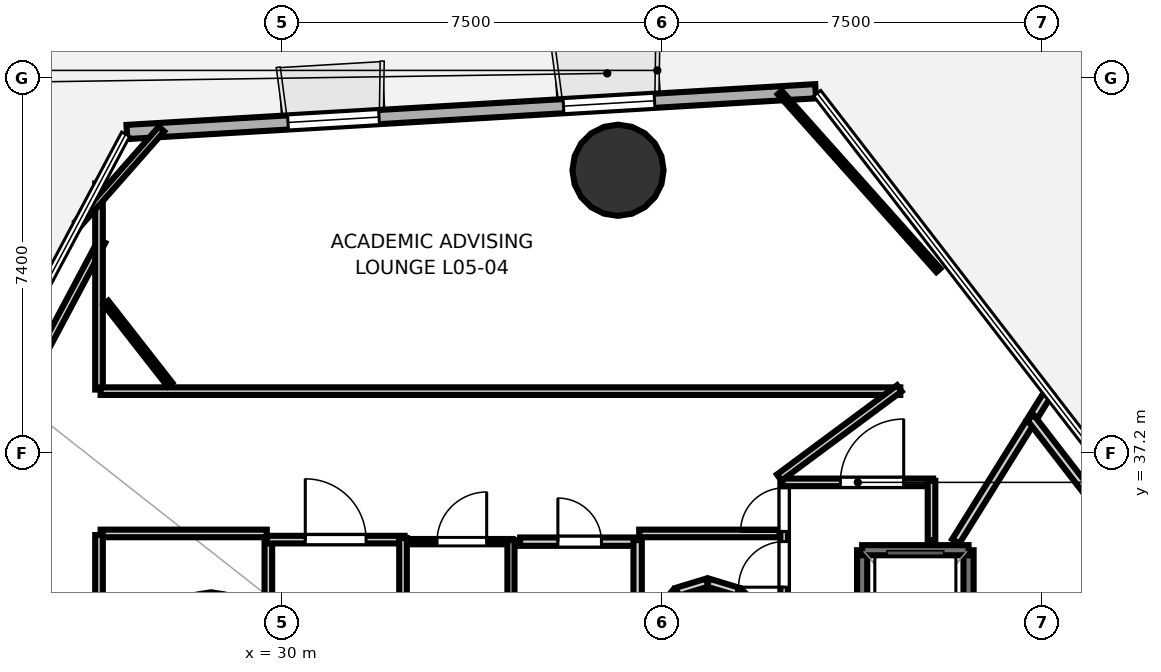
"""IFC4 building model, lengths in metres.
Left out: names, types, materials, properties, quantities, classifications, styles, units other than length and angle.
Written with IfcOpenShell. Run it as: python <this file> out.ifc"""

import sys

from ifc_helpers import new_model, si_unit, direction, frame, frame_2d, origin, origin_2d, place, context, subcontext, project, spatial, rectangle, hollow_circle, extrude, element, fill, save


model = new_model("IFC4")
c1 = context("Model", 3, precision=1e-05, world=origin(), true_north=direction((0.0, 1.0)))
c2 = subcontext(c1, "Body", "Model", "MODEL_VIEW")
j1 = project(units=[si_unit("LENGTHUNIT", "METRE"), si_unit("PLANEANGLEUNIT", "RADIAN")], contexts=[c1])
p1 = place(None, origin())
s1 = spatial("IfcSite", under=j1, at=p1, CompositionType="ELEMENT")
p2 = place(p1, origin())
s2 = spatial("IfcBuilding", under=s1, at=p2, CompositionType="ELEMENT")
p3 = place(p2, frame((0.0, 0.0, 25.7)))
s3 = spatial("IfcBuildingStorey", under=s2, at=p3, CompositionType="ELEMENT", Elevation=25.7)
for number, where, z_axis, x_axis in (
    (1, (28.6, 33.55, 0.0), (0.0, 0.0, 1.0), (1.0, 0.0, 0.0)),
    (2, (38.4, 33.55, 0.0), (0.0, 0.0, 1.0), (1.0, 0.0, 0.0)),
    (3, (36.632, 42.778, 0.0), (0.0, 0.0, 1.0), (1.0, 0.0, 0.0)),
):
    element("IfcColumn", number, at=place(p3, frame(where, z_axis=z_axis, x_axis=x_axis)), inside=s3, PredefinedType="COLUMN", context=c2, shape_type="SweptSolid", body=[
        extrude(hollow_circle(Radius=0.9, WallThickness=0.045, at=origin_2d()), origin(), (0.0, 0.0, 1.0), 3.7),
    ])
p4 = place(p3, frame((40.532, 44.337, 0.0), z_axis=(0.0, 0.0, 1.0), x_axis=(-0.998254407647, -0.059060457267, 0.0)))
e4 = element("IfcWall", 4, at=p4, inside=s3, PredefinedType="SOLIDWALL", context=c2, shape_type="SweptSolid", body=[
    extrude(rectangle(XDim=13.616, YDim=0.28, at=frame_2d((6.808, 0.0))), origin(), (0.0, 0.0, 1.0), 3.52),
])
p5 = place(p4, frame((3.185, 0.0, 0.85)))
e5 = element("IfcOpeningElement", 5, at=p5, cuts=e4, PredefinedType="OPENING", context=c2, shape_type="SweptSolid", body=[
    extrude(rectangle(XDim=1.8, YDim=2.1, at=frame_2d((0.9, 1.05))), frame((0.0, 0.15, 0.0), z_axis=(0.0, -1.0, 0.0), x_axis=(1.0, 0.0, 0.0)), (0.0, 0.0, 1.0), 0.3),
])
p6 = place(p4, frame((8.632, 0.0, 0.85)))
e6 = element("IfcOpeningElement", 6, at=p6, cuts=e4, PredefinedType="OPENING", context=c2, shape_type="SweptSolid", body=[
    extrude(rectangle(XDim=1.8, YDim=2.1, at=frame_2d((0.9, 1.05))), frame((0.0, 0.15, 0.0), z_axis=(0.0, -1.0, 0.0), x_axis=(1.0, 0.0, 0.0)), (0.0, 0.0, 1.0), 0.3),
])
for number, where, z_axis, x_axis in (
    (7, (43.55, 32.92, 0.0), (0.0, 0.0, 1.0), (0.0, 1.0, 0.0)),
    (8, (41.45, 32.92, 0.0), (0.0, 0.0, 1.0), (0.0, 1.0, 0.0)),
):
    element("IfcWall", number, at=place(p3, frame(where, z_axis=z_axis, x_axis=x_axis)), inside=s3, PredefinedType="SOLIDWALL", context=c2, shape_type="SweptSolid", body=[
        extrude(rectangle(XDim=2.36, YDim=0.2, at=frame_2d((1.18, 0.0))), origin(), (0.0, 0.0, 1.0), 3.52),
    ])
p7 = place(p3, frame((41.45, 35.28, 0.0), z_axis=(0.0, 0.0, 1.0), x_axis=(1.0, 0.0, 0.0)))
e9 = element("IfcWall", 9, at=p7, inside=s3, PredefinedType="SOLIDWALL", context=c2, shape_type="SweptSolid", body=[
    extrude(rectangle(XDim=2.1, YDim=0.2, at=frame_2d((1.05, 0.0))), origin(), (0.0, 0.0, 1.0), 3.52),
])
p8 = place(p3, frame((29.731, 33.058, 0.0), z_axis=(0.0, 0.0, 1.0), x_axis=(0.0, 1.0, 0.0)))
e10 = element("IfcWall", 10, at=p8, inside=s3, PredefinedType="PARTITIONING", context=c2, shape_type="SweptSolid", body=[
    extrude(rectangle(XDim=2.462, YDim=0.15, at=frame_2d((1.231, 0.0))), origin(), (0.0, 0.0, 1.0), 2.84),
])
p9 = place(p3, frame((29.7, 35.489, 0.0), z_axis=(0.0, 0.0, 1.0), x_axis=(1.0, 0.0, 0.0)))
e11 = element("IfcWall", 11, at=p9, inside=s3, PredefinedType="PARTITIONING", context=c2, shape_type="SweptSolid", body=[
    extrude(rectangle(XDim=2.72, YDim=0.15, at=frame_2d((1.36, 0.0))), origin(), (0.0, 0.0, 1.0), 2.84),
])
p10 = place(p9, frame((0.76, 0.0, 0.0)))
e12 = element("IfcOpeningElement", 12, at=p10, cuts=e11, PredefinedType="OPENING", context=c2, shape_type="SweptSolid", body=[
    extrude(rectangle(XDim=1.2, YDim=2.15, at=frame_2d((0.6, 1.075))), frame((0.0, 0.085, 0.0), z_axis=(0.0, -1.0, 0.0), x_axis=(1.0, 0.0, 0.0)), (0.0, 0.0, 1.0), 0.17),
])
p11 = place(p3, frame((32.389, 35.52, 0.0), z_axis=(0.0, 0.0, 1.0), x_axis=(0.0, -1.0, 0.0)))
e13 = element("IfcWall", 13, at=p11, inside=s3, PredefinedType="PARTITIONING", context=c2, shape_type="SweptSolid", body=[
    extrude(rectangle(XDim=2.462, YDim=0.15, at=frame_2d((1.231, 0.0))), origin(), (0.0, 0.0, 1.0), 2.84),
])
p12 = place(p3, frame((39.911, 32.64, 0.0), z_axis=(0.0, 0.0, 1.0), x_axis=(0.0, 1.0, 0.0)))
e14 = element("IfcWall", 14, at=p12, inside=s3, PredefinedType="PARTITIONING", context=c2, shape_type="SweptSolid", body=[
    extrude(rectangle(XDim=4.01, YDim=0.15, at=frame_2d((2.005, 0.0))), origin(), (0.0, 0.0, 1.0), 2.84),
])
p13 = place(p12, frame((3.01, 0.0, 0.0)))
e15 = element("IfcOpeningElement", 15, at=p13, cuts=e14, PredefinedType="OPENING", context=c2, shape_type="SweptSolid", body=[
    extrude(rectangle(XDim=0.86, YDim=2.05, at=frame_2d((0.43, 1.025))), frame((0.0, 0.085, 0.0), z_axis=(0.0, -1.0, 0.0), x_axis=(1.0, 0.0, 0.0)), (0.0, 0.0, 1.0), 0.17),
])
p14 = place(p12, frame((1.91, 0.0, 0.0)))
e16 = element("IfcOpeningElement", 16, at=p14, cuts=e14, PredefinedType="OPENING", context=c2, shape_type="SweptSolid", body=[
    extrude(rectangle(XDim=0.9, YDim=2.1, at=frame_2d((0.45, 1.05))), frame((0.0, 0.085, 0.0), z_axis=(0.0, -1.0, 0.0), x_axis=(1.0, 0.0, 0.0)), (0.0, 0.0, 1.0), 0.17),
])
p15 = place(p3, frame((39.88, 36.619, 0.0), z_axis=(0.0, 0.0, 1.0), x_axis=(1.0, 0.0, 0.0)))
e17 = element("IfcWall", 17, at=p15, inside=s3, PredefinedType="PARTITIONING", context=c2, shape_type="SweptSolid", body=[
    extrude(rectangle(XDim=2.97, YDim=0.15, at=frame_2d((1.485, 0.0))), origin(), (0.0, 0.0, 1.0), 2.84),
])
p16 = place(p15, frame((1.14, 0.0, 0.0)))
e18 = element("IfcOpeningElement", 18, at=p16, cuts=e17, PredefinedType="OPENING", context=c2, shape_type="SweptSolid", body=[
    extrude(rectangle(XDim=1.25, YDim=2.2, at=frame_2d((0.625, 1.1))), frame((0.0, 0.085, 0.0), z_axis=(0.0, -1.0, 0.0), x_axis=(1.0, 0.0, 0.0)), (0.0, 0.0, 1.0), 0.17),
])
p17 = place(p3, frame((42.819, 36.65, 0.0), z_axis=(0.0, 0.0, 1.0), x_axis=(0.0, -1.0, 0.0)))
e19 = element("IfcWall", 19, at=p17, inside=s3, PredefinedType="PARTITIONING", context=c2, shape_type="SweptSolid", body=[
    extrude(rectangle(XDim=1.17, YDim=0.15, at=frame_2d((0.585, 0.0))), origin(), (0.0, 0.0, 1.0), 2.84),
])
p18 = place(p3, frame((32.55, 35.449, 0.0), z_axis=(0.0, 0.0, 1.0), x_axis=(1.0, 0.0, 0.0)))
e20 = element("IfcWall", 20, at=p18, inside=s3, PredefinedType="PARTITIONING", context=c2, shape_type="SweptSolid", body=[
    extrude(rectangle(XDim=2.0, YDim=0.105, at=frame_2d((1.0, 0.0))), origin(), (0.0, 0.0, 1.0), 2.84),
])
p19 = place(p18, frame((0.51, 0.0, 0.0)))
e21 = element("IfcOpeningElement", 21, at=p19, cuts=e20, PredefinedType="OPENING", context=c2, shape_type="SweptSolid", body=[
    extrude(rectangle(XDim=0.98, YDim=2.1, at=frame_2d((0.49, 1.05))), frame((0.0, 0.062, 0.0), z_axis=(0.0, -1.0, 0.0), x_axis=(1.0, 0.0, 0.0)), (0.0, 0.0, 1.0), 0.125),
])
p20 = place(p3, frame((34.519, 35.48, 0.0), z_axis=(0.0, 0.0, 1.0), x_axis=(0.0, -1.0, 0.0)))
e22 = element("IfcWall", 22, at=p20, inside=s3, PredefinedType="PARTITIONING", context=c2, shape_type="SweptSolid", body=[
    extrude(rectangle(XDim=1.93, YDim=0.14, at=frame_2d((0.965, 0.0))), origin(), (0.0, 0.0, 1.0), 2.84),
])
p21 = place(p3, frame((34.7, 35.449, 0.0), z_axis=(0.0, 0.0, 1.0), x_axis=(1.0, 0.0, 0.0)))
e23 = element("IfcWall", 23, at=p21, inside=s3, PredefinedType="PLUMBINGWALL", context=c2, shape_type="SweptSolid", body=[
    extrude(rectangle(XDim=2.35, YDim=0.165, at=frame_2d((1.175, 0.0))), origin(), (0.0, 0.0, 1.0), 2.84),
])
p22 = place(p21, frame((0.745, 0.0, 0.0)))
e24 = element("IfcOpeningElement", 24, at=p22, cuts=e23, PredefinedType="OPENING", context=c2, shape_type="SweptSolid", body=[
    extrude(rectangle(XDim=0.86, YDim=2.05, at=frame_2d((0.43, 1.025))), frame((0.0, 0.093, 0.0), z_axis=(0.0, -1.0, 0.0), x_axis=(1.0, 0.0, 0.0)), (0.0, 0.0, 1.0), 0.185),
])
p23 = place(p3, frame((37.019, 35.48, 0.0), z_axis=(0.0, 0.0, 1.0), x_axis=(0.0, -1.0, 0.0)))
e25 = element("IfcWall", 25, at=p23, inside=s3, PredefinedType="PLUMBINGWALL", context=c2, shape_type="SweptSolid", body=[
    extrude(rectangle(XDim=1.93, YDim=0.165, at=frame_2d((0.965, 0.0))), origin(), (0.0, 0.0, 1.0), 2.84),
])
p24 = place(p3, frame((23.577, 35.984, 0.0), z_axis=(0.0, 0.0, 1.0), x_axis=(0.469485142528, 0.882940372248, 0.0)))
e26 = element("IfcWall", 26, at=p24, inside=s3, PredefinedType="PARTITIONING", context=c2, shape_type="SweptSolid", body=[
    extrude(rectangle(XDim=6.113, YDim=0.15, at=frame_2d((3.057, 0.0))), origin(), (0.0, 0.0, 1.0), 2.84),
])
p25 = place(p3, frame((26.389, 42.519, 0.0), z_axis=(0.0, 0.0, 1.0), x_axis=(0.0, -1.0, 0.0)))
e27 = element("IfcWall", 27, at=p25, inside=s3, PredefinedType="PARTITIONING", context=c2, shape_type="SweptSolid", body=[
    extrude(rectangle(XDim=4.069, YDim=0.15, at=frame_2d((2.034, 0.0))), origin(), (0.0, 0.0, 1.0), 2.84),
])
p26 = place(p3, frame((26.42, 38.419, 0.0), z_axis=(0.0, 0.0, 1.0), x_axis=(1.0, 0.0, 0.0)))
e28 = element("IfcWall", 28, at=p26, inside=s3, PredefinedType="PARTITIONING", context=c2, shape_type="SweptSolid", body=[
    extrude(rectangle(XDim=15.783, YDim=0.15, at=frame_2d((7.892, 0.0))), origin(), (0.0, 0.0, 1.0), 2.798),
])
p27 = place(p3, frame((42.185, 38.475, 0.0), z_axis=(0.0, 0.0, 1.0), x_axis=(-0.802818467394, -0.596223538961, 0.0)))
e29 = element("IfcWall", 29, at=p27, inside=s3, PredefinedType="PARTITIONING", context=c2, shape_type="SweptSolid", body=[
    extrude(rectangle(XDim=2.953, YDim=0.15, at=frame_2d((1.477, 0.0))), origin(), (0.0, 0.0, 1.0), 2.798),
])
p28 = place(p3, frame((39.818, 35.611, 0.0), z_axis=(0.0, 0.0, 1.0), x_axis=(-1.0, 0.0, 0.0)))
e30 = element("IfcWall", 30, at=p28, inside=s3, PredefinedType="PARTITIONING", context=c2, shape_type="SweptSolid", body=[
    extrude(rectangle(XDim=2.768, YDim=0.15, at=frame_2d((1.384, 0.0))), origin(), (0.0, 0.0, 1.0), 2.84),
])
p29 = place(p3, frame((29.7, 35.611, 0.0), z_axis=(0.0, 0.0, 1.0), x_axis=(-1.0, 0.0, 0.0)))
e31 = element("IfcWall", 31, at=p29, inside=s3, PredefinedType="PARTITIONING", context=c2, shape_type="SweptSolid", body=[
    extrude(rectangle(XDim=3.28, YDim=0.15, at=frame_2d((1.64, 0.0))), origin(), (0.0, 0.0, 1.0), 2.798),
])
p30 = place(p3, frame((26.389, 35.58, 0.0), z_axis=(0.0, 0.0, 1.0), x_axis=(0.0, -1.0, 0.0)))
e32 = element("IfcWall", 32, at=p30, inside=s3, PredefinedType="PARTITIONING", context=c2, shape_type="SweptSolid", body=[
    extrude(rectangle(XDim=2.71, YDim=0.15, at=frame_2d((1.355, 0.0))), origin(), (0.0, 0.0, 1.0), 2.798),
])
p31 = place(p3, frame((43.297, 35.453, 0.0), z_axis=(0.0, 0.0, 1.0), x_axis=(0.529177490016, 0.848511157298, 0.0)))
e33 = element("IfcWall", 33, at=p31, inside=s3, PredefinedType="PLUMBINGWALL", context=c2, shape_type="SweptSolid", body=[
    extrude(rectangle(XDim=3.474, YDim=0.165, at=frame_2d((1.737, 0.0))), origin(), (0.0, 0.0, 1.0), 2.798),
])
p32 = place(p3, frame((44.772, 37.897, 0.0), z_axis=(0.0, 0.0, 1.0), x_axis=(0.61079855593, -0.791786034275, 0.0)))
e34 = element("IfcWall", 34, at=p32, inside=s3, PredefinedType="PLUMBINGWALL", context=c2, shape_type="SweptSolid", body=[
    extrude(rectangle(XDim=15.177, YDim=0.165, at=frame_2d((7.588, 0.0))), origin(), (0.0, 0.0, 1.0), 2.798),
])
p33 = place(p3, frame((39.303, 34.161, 0.0), z_axis=(0.0, 0.0, 1.0), x_axis=(-0.707106781187, 0.707106781187, 0.0)))
e35 = element("IfcWall", 35, at=p33, inside=s3, PredefinedType="PLUMBINGWALL", context=c2, shape_type="SweptSolid", body=[
    extrude(rectangle(XDim=0.414, YDim=0.165, at=frame_2d((0.207, 0.0))), origin(), (0.0, 0.0, 1.0), 2.84),
])
p34 = place(p3, frame((38.998, 34.461, 0.0), z_axis=(0.0, 0.0, 1.0), x_axis=(-0.956904203315, 0.290403763195, 0.0)))
e36 = element("IfcWall", 36, at=p34, inside=s3, PredefinedType="PLUMBINGWALL", context=c2, shape_type="SweptSolid", body=[
    extrude(rectangle(XDim=0.615, YDim=0.165, at=frame_2d((0.308, 0.0))), origin(), (0.0, 0.0, 1.0), 2.84),
])
p35 = place(p3, frame((38.391, 34.64, 0.0), z_axis=(0.0, 0.0, 1.0), x_axis=(-0.956937641938, -0.290293557355, 0.0)))
e37 = element("IfcWall", 37, at=p35, inside=s3, PredefinedType="PLUMBINGWALL", context=c2, shape_type="SweptSolid", body=[
    extrude(rectangle(XDim=0.616, YDim=0.165, at=frame_2d((0.308, 0.0))), origin(), (0.0, 0.0, 1.0), 2.84),
])
p36 = place(p3, frame((37.787, 34.451, 0.0), z_axis=(0.0, 0.0, 1.0), x_axis=(-0.634468611637, -0.77294862756, 0.0)))
e38 = element("IfcWall", 38, at=p36, inside=s3, PredefinedType="PLUMBINGWALL", context=c2, shape_type="SweptSolid", body=[
    extrude(rectangle(XDim=0.615, YDim=0.165, at=frame_2d((0.308, 0.0))), origin(), (0.0, 0.0, 1.0), 2.84),
])
p37 = place(p3, frame((27.788, 38.549, 0.0), z_axis=(0.0, 0.0, 1.0), x_axis=(-0.615602497153, 0.788056828851, 0.0)))
e39 = element("IfcWall", 39, at=p37, inside=s3, PredefinedType="PARTITIONING", context=c2, shape_type="SweptSolid", body=[
    extrude(rectangle(XDim=2.053, YDim=0.12, at=frame_2d((1.026, 0.0))), origin(), (0.0, 0.0, 1.0), 2.84),
])
p38 = place(p3, frame((25.976, 41.722, 0.0), z_axis=(0.0, 0.0, 1.0), x_axis=(0.66103448623, 0.75035552108, 0.0)))
e40 = element("IfcWall", 40, at=p38, inside=s3, PredefinedType="PARTITIONING", context=c2, shape_type="SweptSolid", body=[
    extrude(rectangle(XDim=2.49, YDim=0.14, at=frame_2d((1.245, 0.0))), origin(), (0.0, 0.0, 1.0), 2.84),
])
p39 = place(p3, frame((39.824, 44.312, 0.0), z_axis=(0.0, 0.0, 1.0), x_axis=(0.665796963086, -0.746132966666, 0.0)))
e41 = element("IfcWall", 41, at=p39, inside=s3, PredefinedType="PARTITIONING", context=c2, shape_type="SweptSolid", body=[
    extrude(rectangle(XDim=4.701, YDim=0.105, at=frame_2d((2.351, 0.0))), origin(), (0.0, 0.0, 1.0), 2.84),
])
p40 = place(p10, origin())
e42 = element("IfcDoor", 42, at=p40, inside=s3, OperationType="SINGLE_SWING_LEFT", PredefinedType="DOOR", context=c2, shape_type="SweptSolid", body=[
    extrude(rectangle(XDim=1.2, YDim=2.15, at=frame_2d((0.6, 1.075))), frame((0.0, 0.025, 0.0), z_axis=(0.0, -1.0, 0.0), x_axis=(1.0, 0.0, 0.0)), (0.0, 0.0, 1.0), 0.05),
])
fill(e12, e42)
p41 = place(p13, origin())
e43 = element("IfcDoor", 43, at=p41, inside=s3, OperationType="SINGLE_SWING_LEFT", PredefinedType="DOOR", context=c2, shape_type="SweptSolid", body=[
    extrude(rectangle(XDim=0.86, YDim=2.05, at=frame_2d((0.43, 1.025))), frame((0.0, 0.025, 0.0), z_axis=(0.0, -1.0, 0.0), x_axis=(1.0, 0.0, 0.0)), (0.0, 0.0, 1.0), 0.05),
])
fill(e15, e43)
p42 = place(p19, origin())
e44 = element("IfcDoor", 44, at=p42, inside=s3, OperationType="SINGLE_SWING_RIGHT", PredefinedType="DOOR", context=c2, shape_type="SweptSolid", body=[
    extrude(rectangle(XDim=0.98, YDim=2.1, at=frame_2d((0.49, 1.05))), frame((0.0, 0.025, 0.0), z_axis=(0.0, -1.0, 0.0), x_axis=(1.0, 0.0, 0.0)), (0.0, 0.0, 1.0), 0.05),
])
fill(e21, e44)
p43 = place(p22, origin())
e45 = element("IfcDoor", 45, at=p43, inside=s3, OperationType="SINGLE_SWING_LEFT", PredefinedType="DOOR", context=c2, shape_type="SweptSolid", body=[
    extrude(rectangle(XDim=0.86, YDim=2.05, at=frame_2d((0.43, 1.025))), frame((0.0, 0.025, 0.0), z_axis=(0.0, -1.0, 0.0), x_axis=(1.0, 0.0, 0.0)), (0.0, 0.0, 1.0), 0.05),
])
fill(e24, e45)
p44 = place(p14, origin())
e46 = element("IfcDoor", 46, at=p44, inside=s3, OperationType="SINGLE_SWING_LEFT", PredefinedType="DOOR", context=c2, shape_type="SweptSolid", body=[
    extrude(rectangle(XDim=0.9, YDim=2.1, at=frame_2d((0.45, 1.05))), frame((0.0, 0.025, 0.0), z_axis=(0.0, -1.0, 0.0), x_axis=(1.0, 0.0, 0.0)), (0.0, 0.0, 1.0), 0.05),
])
fill(e16, e46)
p45 = place(p16, origin())
e47 = element("IfcDoor", 47, at=p45, inside=s3, OperationType="SINGLE_SWING_RIGHT", PredefinedType="DOOR", context=c2, shape_type="SweptSolid", body=[
    extrude(rectangle(XDim=1.25, YDim=2.2, at=frame_2d((0.625, 1.1))), frame((0.0, 0.025, 0.0), z_axis=(0.0, -1.0, 0.0), x_axis=(1.0, 0.0, 0.0)), (0.0, 0.0, 1.0), 0.05),
])
fill(e18, e47)
p46 = place(p5, origin())
e48 = element("IfcWindow", 48, at=p46, inside=s3, PartitioningType="SINGLE_PANEL", PredefinedType="WINDOW", context=c2, shape_type="SweptSolid", body=[
    extrude(rectangle(XDim=1.8, YDim=2.1, at=frame_2d((0.9, 1.05))), frame((0.0, 0.03, 0.0), z_axis=(0.0, -1.0, 0.0), x_axis=(1.0, 0.0, 0.0)), (0.0, 0.0, 1.0), 0.06),
])
fill(e5, e48)
p47 = place(p6, origin())
e49 = element("IfcWindow", 49, at=p47, inside=s3, PartitioningType="SINGLE_PANEL", PredefinedType="WINDOW", context=c2, shape_type="SweptSolid", body=[
    extrude(rectangle(XDim=1.8, YDim=2.1, at=frame_2d((0.9, 1.05))), frame((0.0, 0.03, 0.0), z_axis=(0.0, -1.0, 0.0), x_axis=(1.0, 0.0, 0.0)), (0.0, 0.0, 1.0), 0.06),
])
fill(e6, e49)
save(model, sys.argv[1])
